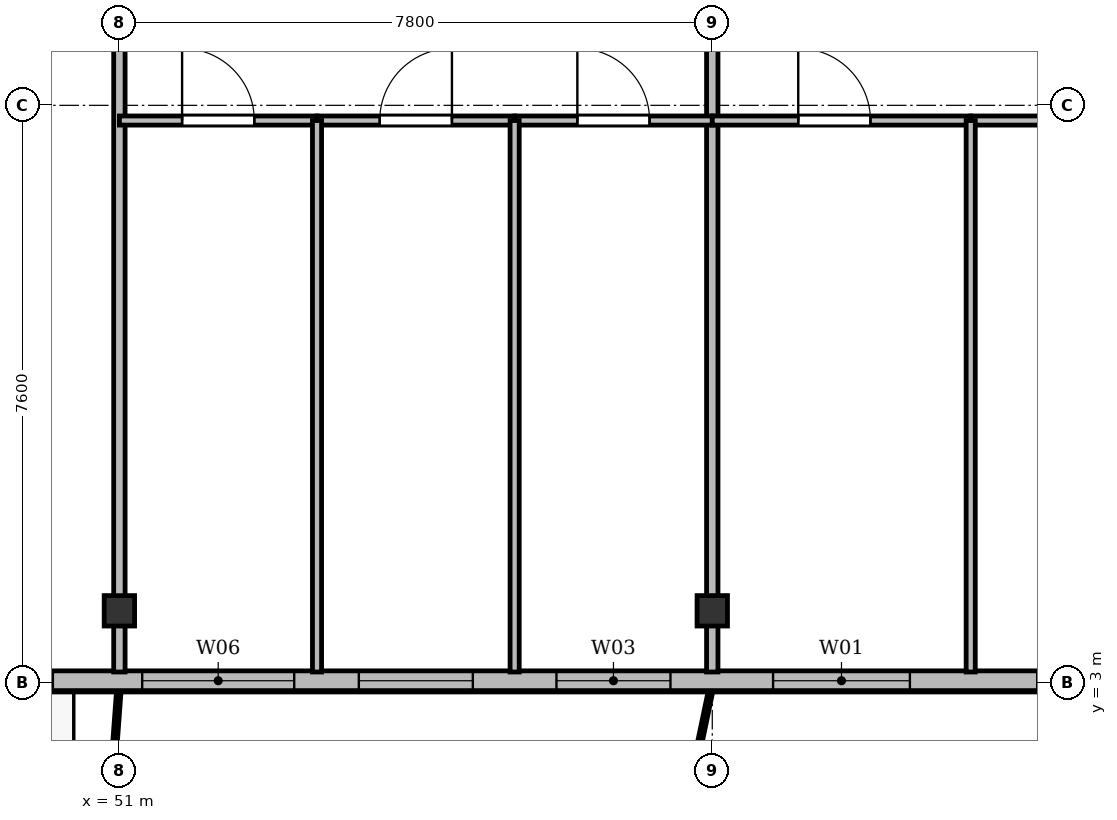
"""IFC4 building model, lengths in metres.
Left out: names, types, materials, properties, quantities, classifications, styles, units other than length and angle.
Written with IfcOpenShell. Run it as: python <this file> out.ifc"""

import sys

from ifc_helpers import new_model, si_unit, direction, frame, frame_2d, origin, origin_2d, place, context, subcontext, project, spatial, rectangle, i_section, extrude, source, transform, mapped, element, fill, save


model = new_model("IFC4")
c1 = context("Model", 3, precision=1e-05, world=origin(), true_north=direction((0.0, 1.0)))
c2 = subcontext(c1, "Body", "Model", "MODEL_VIEW")
j1 = project(units=[si_unit("LENGTHUNIT", "METRE"), si_unit("PLANEANGLEUNIT", "RADIAN")], contexts=[c1])
p1 = place(None, origin())
s1 = spatial("IfcSite", under=j1, at=p1, CompositionType="ELEMENT")
p2 = place(p1, origin())
s2 = spatial("IfcBuilding", under=s1, at=p2, CompositionType="ELEMENT")
p3 = place(p2, frame((0.0, 0.0, 92.5)))
s3 = spatial("IfcBuildingStorey", under=s2, at=p3, CompositionType="ELEMENT", Elevation=92.5)
m1 = source(origin(), c2, "Body", "SweptSolid", [
    extrude(i_section(OverallWidth=0.4, OverallDepth=0.4, WebThickness=0.022, FlangeThickness=0.035, at=origin_2d()), origin(), (0.0, 0.0, 1.0), 3.6),
])
for number, where, z_axis, x_axis in (
    (1, (51.0, 3.95, 0.0), (0.0, 0.0, 1.0), (1.0, 0.0, 0.0)),
    (2, (58.8, 3.95, 0.0), (0.0, 0.0, 1.0), (1.0, 0.0, 0.0)),
):
    element("IfcColumn", number, at=place(p3, frame(where, z_axis=z_axis, x_axis=x_axis)), inside=s3, PredefinedType="COLUMN", context=c2, shape_type="MappedRepresentation", body=[
        mapped(m1, transform((0.0, 0.0, 0.0), x_axis=(1.0, 0.0, 0.0), y_axis=(0.0, 1.0, 0.0), z_axis=(0.0, 0.0, 1.0), scale=1.0)),
    ])
p4 = place(p3, frame((66.9, 3.03, 0.0), z_axis=(0.0, 0.0, 1.0), x_axis=(-1.0, 0.0, 0.0)))
e3 = element("IfcWall", 3, at=p4, inside=s3, PredefinedType="SOLIDWALL", context=c2, shape_type="SweptSolid", body=[
    extrude(rectangle(XDim=59.4, YDim=0.26, at=frame_2d((29.7, 0.0))), origin(), (0.0, 0.0, 1.0), 3.34),
])
p5 = place(p4, frame((2.175, 0.0, 0.9)))
e4 = element("IfcOpeningElement", 4, at=p5, cuts=e3, PredefinedType="OPENING", context=c2, shape_type="SweptSolid", body=[
    extrude(rectangle(XDim=1.65, YDim=1.85, at=frame_2d((0.825, 0.925))), frame((0.0, 0.14, 0.0), z_axis=(0.0, -1.0, 0.0), x_axis=(1.0, 0.0, 0.0)), (0.0, 0.0, 1.0), 0.28),
])
p6 = place(p4, frame((5.5, 0.0, 0.9)))
e5 = element("IfcOpeningElement", 5, at=p6, cuts=e3, PredefinedType="OPENING", context=c2, shape_type="SweptSolid", body=[
    extrude(rectangle(XDim=1.8, YDim=1.8, at=frame_2d((0.9, 0.9))), frame((0.0, 0.14, 0.0), z_axis=(0.0, -1.0, 0.0), x_axis=(1.0, 0.0, 0.0)), (0.0, 0.0, 1.0), 0.28),
])
p7 = place(p4, frame((8.65, 0.0, 0.9)))
e6 = element("IfcOpeningElement", 6, at=p7, cuts=e3, PredefinedType="OPENING", context=c2, shape_type="SweptSolid", body=[
    extrude(rectangle(XDim=1.5, YDim=1.75, at=frame_2d((0.75, 0.875))), frame((0.0, 0.14, 0.0), z_axis=(0.0, -1.0, 0.0), x_axis=(1.0, 0.0, 0.0)), (0.0, 0.0, 1.0), 0.28),
])
p8 = place(p4, frame((11.25, 0.0, 0.9)))
e7 = element("IfcOpeningElement", 7, at=p8, cuts=e3, PredefinedType="OPENING", context=c2, shape_type="SweptSolid", body=[
    extrude(rectangle(XDim=1.5, YDim=1.75, at=frame_2d((0.75, 0.875))), frame((0.0, 0.14, 0.0), z_axis=(0.0, -1.0, 0.0), x_axis=(1.0, 0.0, 0.0)), (0.0, 0.0, 1.0), 0.28),
])
p9 = place(p4, frame((13.6, 0.0, 0.9)))
e8 = element("IfcOpeningElement", 8, at=p9, cuts=e3, PredefinedType="OPENING", context=c2, shape_type="SweptSolid", body=[
    extrude(rectangle(XDim=2.0, YDim=1.95, at=frame_2d((1.0, 0.975))), frame((0.0, 0.14, 0.0), z_axis=(0.0, -1.0, 0.0), x_axis=(1.0, 0.0, 0.0)), (0.0, 0.0, 1.0), 0.28),
])
p10 = place(p4, frame((16.775, 0.0, 0.9)))
e9 = element("IfcOpeningElement", 9, at=p10, cuts=e3, PredefinedType="OPENING", context=c2, shape_type="SweptSolid", body=[
    extrude(rectangle(XDim=1.65, YDim=1.85, at=frame_2d((0.825, 0.925))), frame((0.0, 0.14, 0.0), z_axis=(0.0, -1.0, 0.0), x_axis=(1.0, 0.0, 0.0)), (0.0, 0.0, 1.0), 0.28),
])
p11 = place(p4, frame((20.227, 0.0, 0.0)))
e10 = element("IfcOpeningElement", 10, at=p11, cuts=e3, PredefinedType="OPENING", context=c2, shape_type="SweptSolid", body=[
    extrude(rectangle(XDim=1.2, YDim=2.2, at=frame_2d((0.6, 1.1))), frame((0.0, 0.14, 0.0), z_axis=(0.0, -1.0, 0.0), x_axis=(1.0, 0.0, 0.0)), (0.0, 0.0, 1.0), 0.28),
])
p12 = place(p4, frame((28.6, 0.0, 0.9)))
e11 = element("IfcOpeningElement", 11, at=p12, cuts=e3, PredefinedType="OPENING", context=c2, shape_type="SweptSolid", body=[
    extrude(rectangle(XDim=2.2, YDim=1.8, at=frame_2d((1.1, 0.9))), frame((0.0, 0.14, 0.0), z_axis=(0.0, -1.0, 0.0), x_axis=(1.0, 0.0, 0.0)), (0.0, 0.0, 1.0), 0.28),
])
p13 = place(p4, frame((36.75, 0.0, 0.9)))
e12 = element("IfcOpeningElement", 12, at=p13, cuts=e3, PredefinedType="OPENING", context=c2, shape_type="SweptSolid", body=[
    extrude(rectangle(XDim=1.5, YDim=1.75, at=frame_2d((0.75, 0.875))), frame((0.0, 0.14, 0.0), z_axis=(0.0, -1.0, 0.0), x_axis=(1.0, 0.0, 0.0)), (0.0, 0.0, 1.0), 0.28),
])
p14 = place(p4, frame((39.15, 0.0, 0.9)))
e13 = element("IfcOpeningElement", 13, at=p14, cuts=e3, PredefinedType="OPENING", context=c2, shape_type="SweptSolid", body=[
    extrude(rectangle(XDim=1.5, YDim=1.75, at=frame_2d((0.75, 0.875))), frame((0.0, 0.14, 0.0), z_axis=(0.0, -1.0, 0.0), x_axis=(1.0, 0.0, 0.0)), (0.0, 0.0, 1.0), 0.28),
])
p15 = place(p4, frame((41.475, 0.0, 0.9)))
e14 = element("IfcOpeningElement", 14, at=p15, cuts=e3, PredefinedType="OPENING", context=c2, shape_type="SweptSolid", body=[
    extrude(rectangle(XDim=1.65, YDim=1.85, at=frame_2d((0.825, 0.925))), frame((0.0, 0.14, 0.0), z_axis=(0.0, -1.0, 0.0), x_axis=(1.0, 0.0, 0.0)), (0.0, 0.0, 1.0), 0.28),
])
p16 = place(p4, frame((45.36, 0.0, 0.0)))
e15 = element("IfcOpeningElement", 15, at=p16, cuts=e3, PredefinedType="OPENING", context=c2, shape_type="SweptSolid", body=[
    extrude(rectangle(XDim=1.2, YDim=2.2, at=frame_2d((0.6, 1.1))), frame((0.0, 0.14, 0.0), z_axis=(0.0, -1.0, 0.0), x_axis=(1.0, 0.0, 0.0)), (0.0, 0.0, 1.0), 0.28),
])
p17 = place(p4, frame((48.2, 0.0, 0.9)))
e16 = element("IfcOpeningElement", 16, at=p17, cuts=e3, PredefinedType="OPENING", context=c2, shape_type="SweptSolid", body=[
    extrude(rectangle(XDim=2.2, YDim=1.8, at=frame_2d((1.1, 0.9))), frame((0.0, 0.14, 0.0), z_axis=(0.0, -1.0, 0.0), x_axis=(1.0, 0.0, 0.0)), (0.0, 0.0, 1.0), 0.28),
])
p18 = place(p4, frame((52.25, 0.0, 0.9)))
e17 = element("IfcOpeningElement", 17, at=p18, cuts=e3, PredefinedType="OPENING", context=c2, shape_type="SweptSolid", body=[
    extrude(rectangle(XDim=1.5, YDim=1.75, at=frame_2d((0.75, 0.875))), frame((0.0, 0.14, 0.0), z_axis=(0.0, -1.0, 0.0), x_axis=(1.0, 0.0, 0.0)), (0.0, 0.0, 1.0), 0.28),
])
p19 = place(p4, frame((55.4, 0.0, 0.9)))
e18 = element("IfcOpeningElement", 18, at=p19, cuts=e3, PredefinedType="OPENING", context=c2, shape_type="SweptSolid", body=[
    extrude(rectangle(XDim=2.0, YDim=1.95, at=frame_2d((1.0, 0.975))), frame((0.0, 0.14, 0.0), z_axis=(0.0, -1.0, 0.0), x_axis=(1.0, 0.0, 0.0)), (0.0, 0.0, 1.0), 0.28),
])
for number, where, z_axis, x_axis in (
    (19, (51.0, 3.145, 0.0), (0.0, 0.0, 1.0), (0.0, 1.0, 0.0)),
    (20, (58.8, 3.145, 0.0), (0.0, 0.0, 1.0), (0.0, 1.0, 0.0)),
):
    element("IfcWall", number, at=place(p3, frame(where, z_axis=z_axis, x_axis=x_axis)), inside=s3, PredefinedType="PARTITIONING", context=c2, shape_type="SweptSolid", body=[
        extrude(rectangle(XDim=24.455, YDim=0.15, at=frame_2d((12.228, 0.0))), origin(), (0.0, 0.0, 1.0), 2.84),
    ])
p20 = place(p3, frame((51.0, 10.4, 0.0), z_axis=(0.0, 0.0, 1.0), x_axis=(1.0, 0.0, 0.0)))
e21 = element("IfcWall", 21, at=p20, inside=s3, PredefinedType="PARTITIONING", context=c2, shape_type="SweptSolid", body=[
    extrude(rectangle(XDim=2.6, YDim=0.12, at=frame_2d((1.3, 0.0))), origin(), (0.0, 0.0, 1.0), 2.84),
])
p21 = place(p20, frame((0.825, 0.0, 0.0)))
e22 = element("IfcOpeningElement", 22, at=p21, cuts=e21, PredefinedType="OPENING", context=c2, shape_type="SweptSolid", body=[
    extrude(rectangle(XDim=0.95, YDim=2.15, at=frame_2d((0.475, 1.075))), frame((0.0, 0.07, 0.0), z_axis=(0.0, -1.0, 0.0), x_axis=(1.0, 0.0, 0.0)), (0.0, 0.0, 1.0), 0.14),
])
p22 = place(p3, frame((53.6, 10.4, 0.0), z_axis=(0.0, 0.0, 1.0), x_axis=(1.0, 0.0, 0.0)))
e23 = element("IfcWall", 23, at=p22, inside=s3, PredefinedType="PARTITIONING", context=c2, shape_type="SweptSolid", body=[
    extrude(rectangle(XDim=2.6, YDim=0.12, at=frame_2d((1.3, 0.0))), origin(), (0.0, 0.0, 1.0), 3.34),
])
p23 = place(p22, frame((0.825, 0.0, 0.0)))
e24 = element("IfcOpeningElement", 24, at=p23, cuts=e23, PredefinedType="OPENING", context=c2, shape_type="SweptSolid", body=[
    extrude(rectangle(XDim=0.95, YDim=2.15, at=frame_2d((0.475, 1.075))), frame((0.0, 0.07, 0.0), z_axis=(0.0, -1.0, 0.0), x_axis=(1.0, 0.0, 0.0)), (0.0, 0.0, 1.0), 0.14),
])
p24 = place(p3, frame((53.6, 3.145, 0.0), z_axis=(0.0, 0.0, 1.0), x_axis=(0.0, 1.0, 0.0)))
e25 = element("IfcWall", 25, at=p24, inside=s3, PredefinedType="PARTITIONING", context=c2, shape_type="SweptSolid", body=[
    extrude(rectangle(XDim=7.255, YDim=0.12, at=frame_2d((3.627, 0.0))), origin(), (0.0, 0.0, 1.0), 2.752),
])
p25 = place(p3, frame((56.2, 10.4, 0.0), z_axis=(0.0, 0.0, 1.0), x_axis=(1.0, 0.0, 0.0)))
e26 = element("IfcWall", 26, at=p25, inside=s3, PredefinedType="PARTITIONING", context=c2, shape_type="SweptSolid", body=[
    extrude(rectangle(XDim=2.6, YDim=0.12, at=frame_2d((1.3, 0.0))), origin(), (0.0, 0.0, 1.0), 2.84),
])
p26 = place(p25, frame((0.825, 0.0, 0.0)))
e27 = element("IfcOpeningElement", 27, at=p26, cuts=e26, PredefinedType="OPENING", context=c2, shape_type="SweptSolid", body=[
    extrude(rectangle(XDim=0.95, YDim=2.15, at=frame_2d((0.475, 1.075))), frame((0.0, 0.07, 0.0), z_axis=(0.0, -1.0, 0.0), x_axis=(1.0, 0.0, 0.0)), (0.0, 0.0, 1.0), 0.14),
])
p27 = place(p3, frame((56.2, 3.145, 0.0), z_axis=(0.0, 0.0, 1.0), x_axis=(0.0, 1.0, 0.0)))
e28 = element("IfcWall", 28, at=p27, inside=s3, PredefinedType="PARTITIONING", context=c2, shape_type="SweptSolid", body=[
    extrude(rectangle(XDim=7.255, YDim=0.12, at=frame_2d((3.627, 0.0))), origin(), (0.0, 0.0, 1.0), 2.752),
])
p28 = place(p3, frame((58.8, 10.4, 0.0), z_axis=(0.0, 0.0, 1.0), x_axis=(1.0, 0.0, 0.0)))
e29 = element("IfcWall", 29, at=p28, inside=s3, PredefinedType="PARTITIONING", context=c2, shape_type="SweptSolid", body=[
    extrude(rectangle(XDim=3.4, YDim=0.12, at=frame_2d((1.7, 0.0))), origin(), (0.0, 0.0, 1.0), 2.84),
])
p29 = place(p28, frame((1.131, 0.0, 0.0)))
e30 = element("IfcOpeningElement", 30, at=p29, cuts=e29, PredefinedType="OPENING", context=c2, shape_type="SweptSolid", body=[
    extrude(rectangle(XDim=0.95, YDim=2.15, at=frame_2d((0.475, 1.075))), frame((0.0, 0.07, 0.0), z_axis=(0.0, -1.0, 0.0), x_axis=(1.0, 0.0, 0.0)), (0.0, 0.0, 1.0), 0.14),
])
p30 = place(p3, frame((62.2, 10.4, 0.0), z_axis=(0.0, 0.0, 1.0), x_axis=(1.0, 0.0, 0.0)))
e31 = element("IfcWall", 31, at=p30, inside=s3, PredefinedType="PARTITIONING", context=c2, shape_type="SweptSolid", body=[
    extrude(rectangle(XDim=3.4, YDim=0.12, at=frame_2d((1.7, 0.0))), origin(), (0.0, 0.0, 1.0), 2.84),
])
p31 = place(p30, frame((1.131, 0.0, 0.0)))
e32 = element("IfcOpeningElement", 32, at=p31, cuts=e31, PredefinedType="OPENING", context=c2, shape_type="SweptSolid", body=[
    extrude(rectangle(XDim=0.95, YDim=2.15, at=frame_2d((0.475, 1.075))), frame((0.0, 0.07, 0.0), z_axis=(0.0, -1.0, 0.0), x_axis=(1.0, 0.0, 0.0)), (0.0, 0.0, 1.0), 0.14),
])
p32 = place(p3, frame((62.2, 3.145, 0.0), z_axis=(0.0, 0.0, 1.0), x_axis=(0.0, 1.0, 0.0)))
e33 = element("IfcWall", 33, at=p32, inside=s3, PredefinedType="PARTITIONING", context=c2, shape_type="SweptSolid", body=[
    extrude(rectangle(XDim=7.255, YDim=0.12, at=frame_2d((3.627, 0.0))), origin(), (0.0, 0.0, 1.0), 2.752),
])
m2 = source(origin(), c2, "Body", "SweptSolid", [
    extrude(rectangle(XDim=1.65, YDim=1.85, at=frame_2d((0.825, 0.925))), frame((0.0, 0.03, 0.0), z_axis=(0.0, -1.0, 0.0), x_axis=(1.0, 0.0, 0.0)), (0.0, 0.0, 1.0), 0.06),
])
p33 = place(p5, origin())
e34 = element("IfcWindow", 34, at=p33, inside=s3, PartitioningType="SINGLE_PANEL", PredefinedType="WINDOW", context=c2, shape_type="MappedRepresentation", body=[
    mapped(m2, transform((0.0, 0.0, 0.0), x_axis=(1.0, 0.0, 0.0), y_axis=(0.0, 1.0, 0.0), z_axis=(0.0, 0.0, 1.0), scale=1.0)),
])
fill(e4, e34)
m3 = source(origin(), c2, "Body", "SweptSolid", [
    extrude(rectangle(XDim=1.8, YDim=1.8, at=frame_2d((0.9, 0.9))), frame((0.0, 0.03, 0.0), z_axis=(0.0, -1.0, 0.0), x_axis=(1.0, 0.0, 0.0)), (0.0, 0.0, 1.0), 0.06),
])
p34 = place(p6, origin())
e35 = element("IfcWindow", 35, at=p34, inside=s3, PartitioningType="SINGLE_PANEL", PredefinedType="WINDOW", context=c2, shape_type="MappedRepresentation", body=[
    mapped(m3, transform((0.0, 0.0, 0.0), x_axis=(1.0, 0.0, 0.0), y_axis=(0.0, 1.0, 0.0), z_axis=(0.0, 0.0, 1.0), scale=1.0)),
])
fill(e5, e35)
m4 = source(origin(), c2, "Body", "SweptSolid", [
    extrude(rectangle(XDim=1.5, YDim=1.75, at=frame_2d((0.75, 0.875))), frame((0.0, 0.03, 0.0), z_axis=(0.0, -1.0, 0.0), x_axis=(1.0, 0.0, 0.0)), (0.0, 0.0, 1.0), 0.06),
])
p35 = place(p7, origin())
e36 = element("IfcWindow", 36, at=p35, inside=s3, PartitioningType="SINGLE_PANEL", PredefinedType="WINDOW", context=c2, shape_type="MappedRepresentation", body=[
    mapped(m4, transform((0.0, 0.0, 0.0), x_axis=(1.0, 0.0, 0.0), y_axis=(0.0, 1.0, 0.0), z_axis=(0.0, 0.0, 1.0), scale=1.0)),
])
fill(e6, e36)
p36 = place(p8, origin())
e37 = element("IfcWindow", 37, at=p36, inside=s3, PartitioningType="SINGLE_PANEL", PredefinedType="WINDOW", context=c2, shape_type="MappedRepresentation", body=[
    mapped(m4, transform((0.0, 0.0, 0.0), x_axis=(1.0, 0.0, 0.0), y_axis=(0.0, 1.0, 0.0), z_axis=(0.0, 0.0, 1.0), scale=1.0)),
])
fill(e7, e37)
m5 = source(origin(), c2, "Body", "SweptSolid", [
    extrude(rectangle(XDim=2.0, YDim=1.95, at=frame_2d((1.0, 0.975))), frame((0.0, 0.03, 0.0), z_axis=(0.0, -1.0, 0.0), x_axis=(1.0, 0.0, 0.0)), (0.0, 0.0, 1.0), 0.06),
])
p37 = place(p9, origin())
e38 = element("IfcWindow", 38, at=p37, inside=s3, PartitioningType="SINGLE_PANEL", PredefinedType="WINDOW", context=c2, shape_type="MappedRepresentation", body=[
    mapped(m5, transform((0.0, 0.0, 0.0), x_axis=(1.0, 0.0, 0.0), y_axis=(0.0, 1.0, 0.0), z_axis=(0.0, 0.0, 1.0), scale=1.0)),
])
fill(e8, e38)
p38 = place(p10, origin())
e39 = element("IfcWindow", 39, at=p38, inside=s3, PartitioningType="SINGLE_PANEL", PredefinedType="WINDOW", context=c2, shape_type="MappedRepresentation", body=[
    mapped(m2, transform((0.0, 0.0, 0.0), x_axis=(1.0, 0.0, 0.0), y_axis=(0.0, 1.0, 0.0), z_axis=(0.0, 0.0, 1.0), scale=1.0)),
])
fill(e9, e39)
m6 = source(origin(), c2, "Body", "SweptSolid", [
    extrude(rectangle(XDim=0.95, YDim=2.15, at=frame_2d((0.475, 1.075))), frame((0.0, 0.025, 0.0), z_axis=(0.0, -1.0, 0.0), x_axis=(1.0, 0.0, 0.0)), (0.0, 0.0, 1.0), 0.05),
])
p39 = place(p21, origin())
e40 = element("IfcDoor", 40, at=p39, inside=s3, OperationType="SINGLE_SWING_LEFT", PredefinedType="DOOR", context=c2, shape_type="MappedRepresentation", body=[
    mapped(m6, transform((0.0, 0.0, 0.0), x_axis=(1.0, 0.0, 0.0), y_axis=(0.0, 1.0, 0.0), z_axis=(0.0, 0.0, 1.0), scale=1.0)),
])
fill(e22, e40)
p40 = place(p23, origin())
e41 = element("IfcDoor", 41, at=p40, inside=s3, OperationType="SINGLE_SWING_RIGHT", PredefinedType="DOOR", context=c2, shape_type="MappedRepresentation", body=[
    mapped(m6, transform((0.0, 0.0, 0.0), x_axis=(1.0, 0.0, 0.0), y_axis=(0.0, 1.0, 0.0), z_axis=(0.0, 0.0, 1.0), scale=1.0)),
])
fill(e24, e41)
p41 = place(p26, origin())
e42 = element("IfcDoor", 42, at=p41, inside=s3, OperationType="SINGLE_SWING_LEFT", PredefinedType="DOOR", context=c2, shape_type="MappedRepresentation", body=[
    mapped(m6, transform((0.0, 0.0, 0.0), x_axis=(1.0, 0.0, 0.0), y_axis=(0.0, 1.0, 0.0), z_axis=(0.0, 0.0, 1.0), scale=1.0)),
])
fill(e27, e42)
p42 = place(p29, origin())
e43 = element("IfcDoor", 43, at=p42, inside=s3, OperationType="SINGLE_SWING_LEFT", PredefinedType="DOOR", context=c2, shape_type="MappedRepresentation", body=[
    mapped(m6, transform((0.0, 0.0, 0.0), x_axis=(1.0, 0.0, 0.0), y_axis=(0.0, 1.0, 0.0), z_axis=(0.0, 0.0, 1.0), scale=1.0)),
])
fill(e30, e43)
save(model, sys.argv[1])
